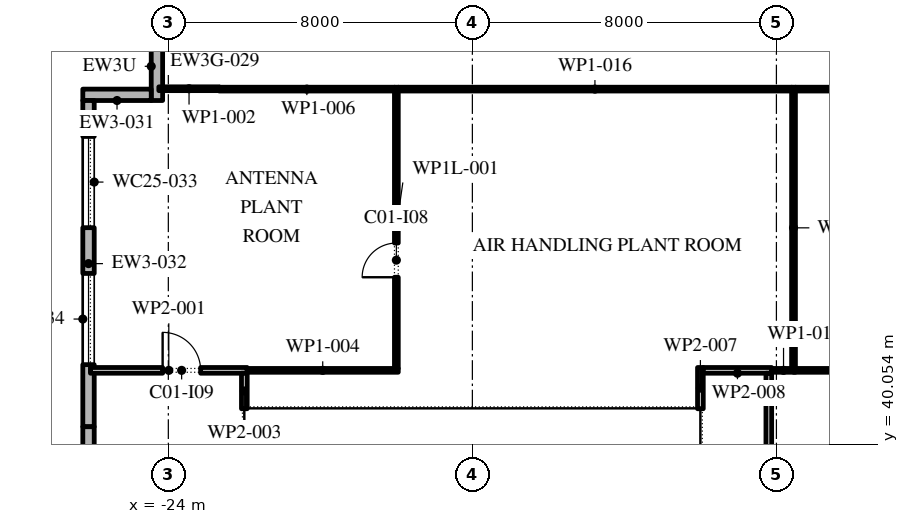
"""IFC4 building model, lengths in metres.
Left out: names, types, materials, properties, quantities, classifications, styles, units other than length and angle.
Written with IfcOpenShell. Run it as: python <this file> out.ifc"""

import sys

from ifc_helpers import new_model, si_unit, direction, frame, frame_2d, origin, place, context, subcontext, project, spatial, polyline, rectangle, outline, extrude, element, fill, save


model = new_model("IFC4")
c1 = context("Model", 3, precision=1e-05, world=origin(), true_north=direction((0.0, 1.0)))
c2 = subcontext(c1, "Body", "Model", "MODEL_VIEW")
j1 = project(units=[si_unit("LENGTHUNIT", "METRE"), si_unit("PLANEANGLEUNIT", "RADIAN")], contexts=[c1])
p1 = place(None, origin())
s1 = spatial("IfcSite", under=j1, at=p1, CompositionType="ELEMENT")
p2 = place(p1, origin())
s2 = spatial("IfcBuilding", under=s1, at=p2, CompositionType="ELEMENT")
p3 = place(p2, frame((0.0, 0.0, 369.0)))
s3 = spatial("IfcBuildingStorey", under=s2, at=p3, CompositionType="ELEMENT", Elevation=369.0)
p4 = place(p3, frame((-24.3, 50.9, 0.0), z_axis=(0.0, 0.0, 1.0), x_axis=(0.0, -1.0, 0.0)))
e1 = element("IfcWall", 1, at=p4, inside=s3, PredefinedType="STANDARD", context=c2, shape_type="SweptSolid", body=[
    extrude(outline(polyline([(0.0, 0.0), (1.8, 0.0), (1.8, 4.0), (0.272, 4.0), (0.272, 6.298), (0.0, 6.115), (0.0, 0.0)])), frame((0.0, 0.15, 0.0), z_axis=(0.0, -1.0, 0.0), x_axis=(1.0, 0.0, 0.0)), (0.0, 0.0, 1.0), 0.3),
])
p5 = place(p3, frame((-24.45, 49.25, 0.0), z_axis=(0.0, 0.0, 1.0), x_axis=(-1.0, 0.0, 0.0)))
e2 = element("IfcWall", 2, at=p5, inside=s3, PredefinedType="STANDARD", context=c2, shape_type="SweptSolid", body=[
    extrude(rectangle(XDim=1.8, YDim=0.3, at=frame_2d((0.9, 0.0))), origin(), (0.0, 0.0, 1.0), 4.0),
])
p6 = place(p3, frame((-26.1, 49.1, 0.0), z_axis=(0.0, 0.0, 1.0), x_axis=(0.0, -1.0, 0.0)))
e3 = element("IfcWall", 3, at=p6, inside=s3, PredefinedType="STANDARD", context=c2, shape_type="SweptSolid", body=[
    extrude(rectangle(XDim=8.583, YDim=0.3, at=frame_2d((4.292, 0.0))), origin(), (0.0, 0.0, 1.0), 4.0),
])
p7 = place(p6, frame((0.946, 0.0, 0.8)))
e4 = element("IfcOpeningElement", 4, at=p7, cuts=e3, PredefinedType="OPENING", context=c2, shape_type="SweptSolid", body=[
    extrude(outline(polyline([(0.0, 0.0), (2.4, 0.0), (2.4, 1.25), (2.377, 1.488), (2.31, 1.717), (2.2, 1.929), (2.051, 2.116), (1.87, 2.272), (1.663, 2.391), (1.437, 2.468), (1.2, 2.5), (0.963, 2.468), (0.737, 2.391), (0.53, 2.272), (0.349, 2.116), (0.2, 1.929), (0.09, 1.717), (0.023, 1.488), (0.0, 1.25), (0.0, 0.0)])), frame((0.0, 0.16, 0.0), z_axis=(0.0, -1.0, 0.0), x_axis=(1.0, 0.0, 0.0)), (0.0, 0.0, 1.0), 0.32),
])
p8 = place(p6, frame((4.55, 0.0, 0.8)))
e5 = element("IfcOpeningElement", 5, at=p8, cuts=e3, PredefinedType="OPENING", context=c2, shape_type="SweptSolid", body=[
    extrude(outline(polyline([(0.0, 0.0), (2.4, 0.0), (2.4, 1.25), (2.377, 1.488), (2.31, 1.717), (2.2, 1.929), (2.051, 2.116), (1.87, 2.272), (1.663, 2.391), (1.437, 2.468), (1.2, 2.5), (0.963, 2.468), (0.737, 2.391), (0.53, 2.272), (0.349, 2.116), (0.2, 1.929), (0.09, 1.717), (0.023, 1.488), (0.0, 1.25), (0.0, 0.0)])), frame((0.0, 0.16, 0.0), z_axis=(0.0, -1.0, 0.0), x_axis=(1.0, 0.0, 0.0)), (0.0, 0.0, 1.0), 0.32),
])
p9 = place(p3, frame((-26.1, 40.517, 0.0), z_axis=(0.0, 0.0, 1.0), x_axis=(0.0, -1.0, 0.0)))
e6 = element("IfcWall", 6, at=p9, inside=s3, PredefinedType="STANDARD", context=c2, shape_type="SweptSolid", body=[
    extrude(rectangle(XDim=8.583, YDim=0.3, at=frame_2d((4.292, 0.0))), origin(), (0.0, 0.0, 1.0), 4.0),
])
p10 = place(p9, frame((0.946, 0.0, 0.8)))
e7 = element("IfcOpeningElement", 7, at=p10, cuts=e6, PredefinedType="OPENING", context=c2, shape_type="SweptSolid", body=[
    extrude(outline(polyline([(0.0, 0.0), (2.4, 0.0), (2.4, 1.25), (2.377, 1.488), (2.31, 1.717), (2.2, 1.929), (2.051, 2.116), (1.87, 2.272), (1.663, 2.391), (1.437, 2.468), (1.2, 2.5), (0.963, 2.468), (0.737, 2.391), (0.53, 2.272), (0.349, 2.116), (0.2, 1.929), (0.09, 1.717), (0.023, 1.488), (0.0, 1.25), (0.0, 0.0)])), frame((0.0, 0.16, 0.0), z_axis=(0.0, -1.0, 0.0), x_axis=(1.0, 0.0, 0.0)), (0.0, 0.0, 1.0), 0.32),
])
p11 = place(p9, frame((5.238, 0.0, 0.8)))
e8 = element("IfcOpeningElement", 8, at=p11, cuts=e6, PredefinedType="OPENING", context=c2, shape_type="SweptSolid", body=[
    extrude(outline(polyline([(0.0, 0.0), (2.4, 0.0), (2.4, 1.25), (2.377, 1.488), (2.31, 1.717), (2.2, 1.929), (2.051, 2.116), (1.87, 2.272), (1.663, 2.391), (1.437, 2.468), (1.2, 2.5), (0.963, 2.468), (0.737, 2.391), (0.53, 2.272), (0.349, 2.116), (0.2, 1.929), (0.09, 1.717), (0.023, 1.488), (0.0, 1.25), (0.0, 0.0)])), frame((0.0, 0.16, 0.0), z_axis=(0.0, -1.0, 0.0), x_axis=(1.0, 0.0, 0.0)), (0.0, 0.0, 1.0), 0.32),
])
p12 = place(p3, frame((-26.05, 42.0, 0.0), z_axis=(0.0, 0.0, 1.0), x_axis=(1.0, 0.0, 0.0)))
e9 = element("IfcWall", 9, at=p12, inside=s3, PredefinedType="PARTITIONING", context=c2, shape_type="SweptSolid", body=[
    extrude(rectangle(XDim=4.125, YDim=0.15, at=frame_2d((2.062, 0.0))), origin(), (0.0, 0.0, 1.0), 4.0),
])
p13 = place(p12, frame((1.9, 0.0, 0.0)))
e10 = element("IfcOpeningElement", 10, at=p13, cuts=e9, PredefinedType="OPENING", context=c2, shape_type="SweptSolid", body=[
    extrude(rectangle(XDim=1.0, YDim=2.1, at=frame_2d((0.5, 1.05))), frame((0.0, 0.085, 0.0), z_axis=(0.0, -1.0, 0.0), x_axis=(1.0, 0.0, 0.0)), (0.0, 0.0, 1.0), 0.17),
])
p14 = place(p3, frame((-22.66, 49.41, 0.0), z_axis=(0.0, 0.0, 1.0), x_axis=(-1.0, 0.0, 0.0)))
e11 = element("IfcWall", 11, at=p14, inside=s3, PredefinedType="PARTITIONING", context=c2, shape_type="SweptSolid", body=[
    extrude(rectangle(XDim=1.59, YDim=0.1, at=frame_2d((0.795, 0.0))), origin(), (0.0, 0.0, 1.0), 4.0),
])
p15 = place(p3, frame((-22.0, 41.925, 0.0), z_axis=(0.0, 0.0, 1.0), x_axis=(0.0, -1.0, 0.0)))
e12 = element("IfcWall", 12, at=p15, inside=s3, PredefinedType="PARTITIONING", context=c2, shape_type="SweptSolid", body=[
    extrude(rectangle(XDim=0.935, YDim=0.15, at=frame_2d((0.468, 0.0))), origin(), (0.0, 0.0, 1.0), 4.0),
])
p16 = place(p3, frame((-21.925, 42.0, 0.0), z_axis=(0.0, 0.0, 1.0), x_axis=(1.0, 0.0, 0.0)))
e13 = element("IfcWall", 13, at=p16, inside=s3, PredefinedType="PARTITIONING", context=c2, shape_type="SweptSolid", body=[
    extrude(rectangle(XDim=3.975, YDim=0.1, at=frame_2d((1.988, 0.0))), origin(), (0.0, 0.0, 1.0), 4.0),
])
p17 = place(p3, frame((-18.0, 42.05, 0.0), z_axis=(0.0, 0.0, 1.0), x_axis=(0.0, 1.0, 0.0)))
e14 = element("IfcWall", 14, at=p17, inside=s3, PredefinedType="PARTITIONING", context=c2, shape_type="SweptSolid", body=[
    extrude(rectangle(XDim=7.4, YDim=0.1, at=frame_2d((3.7, 0.0))), origin(), (0.0, 0.0, 1.0), 3.02),
])
p18 = place(p17, frame((2.4, 0.0, 0.0)))
e15 = element("IfcOpeningElement", 15, at=p18, cuts=e14, PredefinedType="OPENING", context=c2, shape_type="SweptSolid", body=[
    extrude(rectangle(XDim=0.9, YDim=2.1, at=frame_2d((0.45, 1.05))), frame((0.0, 0.06, 0.0), z_axis=(0.0, -1.0, 0.0), x_axis=(1.0, 0.0, 0.0)), (0.0, 0.0, 1.0), 0.12),
])
p19 = place(p3, frame((-18.05, 49.4, 0.0), z_axis=(0.0, 0.0, 1.0), x_axis=(-1.0, 0.0, 0.0)))
e16 = element("IfcWall", 16, at=p19, inside=s3, PredefinedType="PARTITIONING", context=c2, shape_type="SweptSolid", body=[
    extrude(rectangle(XDim=4.61, YDim=0.1, at=frame_2d((2.305, 0.0))), origin(), (0.0, 0.0, 1.0), 4.0),
])
p20 = place(p3, frame((-10.0, 40.99, 0.0), z_axis=(0.0, 0.0, 1.0), x_axis=(0.0, 1.0, 0.0)))
e17 = element("IfcWall", 17, at=p20, inside=s3, PredefinedType="PARTITIONING", context=c2, shape_type="SweptSolid", body=[
    extrude(rectangle(XDim=1.085, YDim=0.15, at=frame_2d((0.542, 0.0))), origin(), (0.0, 0.0, 1.0), 4.0),
])
p21 = place(p3, frame((-9.925, 42.0, 0.0), z_axis=(0.0, 0.0, 1.0), x_axis=(1.0, 0.0, 0.0)))
e18 = element("IfcWall", 18, at=p21, inside=s3, PredefinedType="PARTITIONING", context=c2, shape_type="SweptSolid", body=[
    extrude(rectangle(XDim=1.8, YDim=0.15, at=frame_2d((0.9, 0.0))), origin(), (0.0, 0.0, 1.0), 4.0),
])
p22 = place(p3, frame((-8.2, 41.925, 0.0), z_axis=(0.0, 0.0, 1.0), x_axis=(0.0, -1.0, 0.0)))
e19 = element("IfcWall", 19, at=p22, inside=s3, PredefinedType="PARTITIONING", context=c2, shape_type="SweptSolid", body=[
    extrude(rectangle(XDim=12.57, YDim=0.15, at=frame_2d((6.285, 0.0))), origin(), (0.0, 0.0, 1.0), 4.0),
])
p23 = place(p22, frame((6.995, 0.0, 0.0)))
e20 = element("IfcOpeningElement", 20, at=p23, cuts=e19, PredefinedType="OPENING", context=c2, shape_type="SweptSolid", body=[
    extrude(rectangle(XDim=1.0, YDim=2.1, at=frame_2d((0.5, 1.05))), frame((0.0, 0.085, 0.0), z_axis=(0.0, -1.0, 0.0), x_axis=(1.0, 0.0, 0.0)), (0.0, 0.0, 1.0), 0.17),
])
p24 = place(p3, frame((-8.125, 42.0, 0.0), z_axis=(0.0, 0.0, 1.0), x_axis=(1.0, 0.0, 0.0)))
e21 = element("IfcWall", 21, at=p24, inside=s3, PredefinedType="PARTITIONING", context=c2, shape_type="SweptSolid", body=[
    extrude(rectangle(XDim=0.625, YDim=0.1, at=frame_2d((0.312, 0.0))), origin(), (0.0, 0.0, 1.0), 4.0),
])
p25 = place(p3, frame((-7.55, 42.05, 0.0), z_axis=(0.0, 0.0, 1.0), x_axis=(0.0, 1.0, 0.0)))
e22 = element("IfcWall", 22, at=p25, inside=s3, PredefinedType="PARTITIONING", context=c2, shape_type="SweptSolid", body=[
    extrude(rectangle(XDim=7.4, YDim=0.1, at=frame_2d((3.7, 0.0))), origin(), (0.0, 0.0, 1.0), 4.0),
])
p26 = place(p3, frame((-7.55, 42.0, 0.0), z_axis=(0.0, 0.0, 1.0), x_axis=(1.0, 0.0, 0.0)))
e23 = element("IfcWall", 23, at=p26, inside=s3, PredefinedType="PARTITIONING", context=c2, shape_type="SweptSolid", body=[
    extrude(rectangle(XDim=7.6, YDim=0.1, at=frame_2d((3.8, 0.0))), origin(), (0.0, 0.0, 1.0), 4.0),
])
p27 = place(p26, frame((1.7, 0.0, 0.0)))
e24 = element("IfcOpeningElement", 24, at=p27, cuts=e23, PredefinedType="OPENING", context=c2, shape_type="SweptSolid", body=[
    extrude(rectangle(XDim=0.9, YDim=2.1, at=frame_2d((0.45, 1.05))), frame((0.0, 0.06, 0.0), z_axis=(0.0, -1.0, 0.0), x_axis=(1.0, 0.0, 0.0)), (0.0, 0.0, 1.0), 0.12),
])
p28 = place(p3, frame((-7.6, 49.4, 0.0), z_axis=(0.0, 0.0, 1.0), x_axis=(-1.0, 0.0, 0.0)))
e25 = element("IfcWall", 25, at=p28, inside=s3, PredefinedType="PARTITIONING", context=c2, shape_type="SweptSolid", body=[
    extrude(rectangle(XDim=10.35, YDim=0.1, at=frame_2d((5.175, 0.0))), origin(), (0.0, 0.0, 1.0), 4.0),
])
p29 = place(p3, frame((1.95, 49.4, 0.0), z_axis=(0.0, 0.0, 1.0), x_axis=(-1.0, 0.0, 0.0)))
e26 = element("IfcWall", 26, at=p29, inside=s3, PredefinedType="PARTITIONING", context=c2, shape_type="SweptSolid", body=[
    extrude(rectangle(XDim=9.45, YDim=0.1, at=frame_2d((4.725, 0.0))), origin(), (0.0, 0.0, 1.0), 4.0),
])
p30 = place(p7, origin())
e27 = element("IfcWindow", 27, at=p30, inside=s3, PartitioningType="DOUBLE_PANEL_VERTICAL", PredefinedType="WINDOW", context=c2, shape_type="SweptSolid", body=[
    extrude(outline(polyline([(0.0, 0.0), (2.4, 0.0), (2.4, 1.25), (2.377, 1.488), (2.31, 1.717), (2.2, 1.929), (2.051, 2.116), (1.87, 2.272), (1.663, 2.391), (1.437, 2.468), (1.2, 2.5), (0.963, 2.468), (0.737, 2.391), (0.53, 2.272), (0.349, 2.116), (0.2, 1.929), (0.09, 1.717), (0.023, 1.488), (0.0, 1.25), (0.0, 0.0)])), frame((0.0, 0.03, 0.0), z_axis=(0.0, -1.0, 0.0), x_axis=(1.0, 0.0, 0.0)), (0.0, 0.0, 1.0), 0.06),
])
fill(e4, e27)
p31 = place(p8, origin())
e28 = element("IfcWindow", 28, at=p31, inside=s3, PartitioningType="DOUBLE_PANEL_VERTICAL", PredefinedType="WINDOW", context=c2, shape_type="SweptSolid", body=[
    extrude(outline(polyline([(0.0, 0.0), (2.4, 0.0), (2.4, 1.25), (2.377, 1.488), (2.31, 1.717), (2.2, 1.929), (2.051, 2.116), (1.87, 2.272), (1.663, 2.391), (1.437, 2.468), (1.2, 2.5), (0.963, 2.468), (0.737, 2.391), (0.53, 2.272), (0.349, 2.116), (0.2, 1.929), (0.09, 1.717), (0.023, 1.488), (0.0, 1.25), (0.0, 0.0)])), frame((0.0, 0.03, 0.0), z_axis=(0.0, -1.0, 0.0), x_axis=(1.0, 0.0, 0.0)), (0.0, 0.0, 1.0), 0.06),
])
fill(e5, e28)
p32 = place(p18, origin())
e29 = element("IfcDoor", 29, at=p32, inside=s3, OperationType="SINGLE_SWING_RIGHT", PredefinedType="DOOR", context=c2, shape_type="SweptSolid", body=[
    extrude(rectangle(XDim=0.9, YDim=2.1, at=frame_2d((0.45, 1.05))), frame((0.0, 0.025, 0.0), z_axis=(0.0, -1.0, 0.0), x_axis=(1.0, 0.0, 0.0)), (0.0, 0.0, 1.0), 0.05),
])
fill(e15, e29)
p33 = place(p13, origin())
e30 = element("IfcDoor", 30, at=p33, inside=s3, OperationType="SINGLE_SWING_RIGHT", PredefinedType="DOOR", context=c2, shape_type="SweptSolid", body=[
    extrude(rectangle(XDim=1.0, YDim=2.1, at=frame_2d((0.5, 1.05))), frame((0.0, 0.025, 0.0), z_axis=(0.0, -1.0, 0.0), x_axis=(1.0, 0.0, 0.0)), (0.0, 0.0, 1.0), 0.05),
])
fill(e10, e30)
save(model, sys.argv[1])
